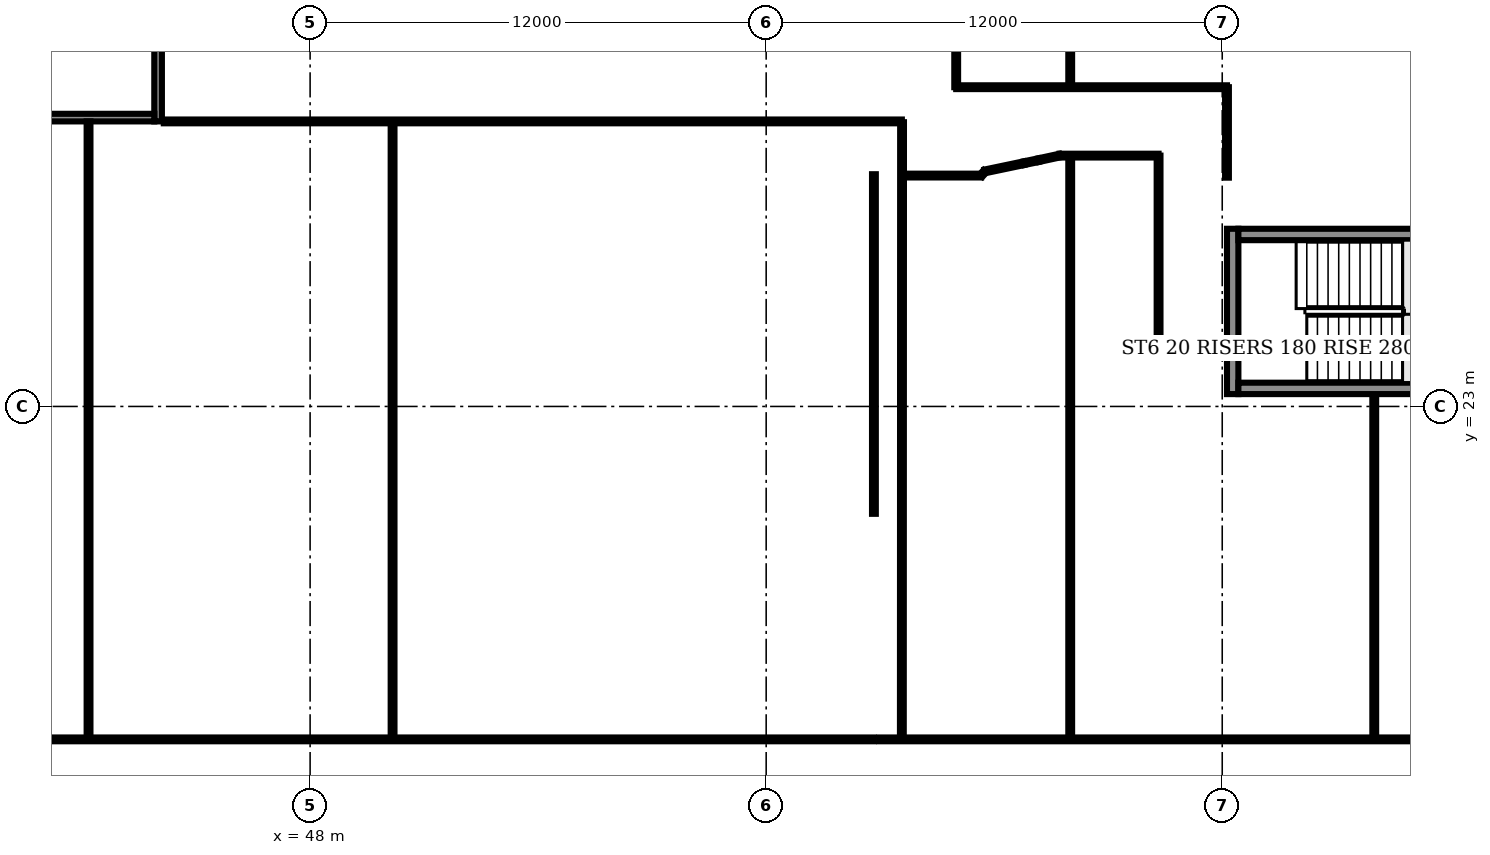
"""IFC4 building model, lengths in metres.
Left out: names, types, materials, properties, quantities, classifications, styles, units other than length and angle.
Written with IfcOpenShell. Run it as: python <this file> out.ifc"""

import sys

from ifc_helpers import new_model, si_unit, direction, frame, frame_2d, origin, origin_2d, place, context, subcontext, project, spatial, rectangle, i_section, extrude, element, fill, save


model = new_model("IFC4")
c1 = context("Model", 3, precision=1e-05, world=origin(), true_north=direction((0.0, 1.0)))
c2 = subcontext(c1, "Body", "Model", "MODEL_VIEW")
j1 = project(units=[si_unit("LENGTHUNIT", "METRE"), si_unit("PLANEANGLEUNIT", "RADIAN")], contexts=[c1])
p1 = place(None, origin())
s1 = spatial("IfcSite", under=j1, at=p1, CompositionType="ELEMENT")
p2 = place(p1, origin())
s2 = spatial("IfcBuilding", under=s1, at=p2, CompositionType="ELEMENT")
p3 = place(p2, frame((0.0, 0.0, 41.5)))
s3 = spatial("IfcBuildingStorey", under=s2, at=p3, CompositionType="ELEMENT", Elevation=41.5)
for number, where, z_axis, x_axis in (
    (1, (48.0, 23.0, 0.0), (0.0, 0.0, 1.0), (1.0, 0.0, 0.0)),
    (2, (60.0, 23.0, 0.0), (0.0, 0.0, 1.0), (1.0, 0.0, 0.0)),
):
    element("IfcColumn", number, at=place(p3, frame(where, z_axis=z_axis, x_axis=x_axis)), inside=s3, PredefinedType="COLUMN", context=c2, shape_type="SweptSolid", body=[
        extrude(i_section(OverallWidth=0.305, OverallDepth=0.62, WebThickness=0.021, FlangeThickness=0.04, FilletRadius=0.027, at=origin_2d()), origin(), (0.0, 0.0, 1.0), 3.6),
    ])
p4 = place(p3, frame((91.926, 0.211, 0.0), z_axis=(0.0, 0.0, 1.0), x_axis=(-0.351119, 0.93633, 0.0)))
e3 = element("IfcWall", 3, at=p4, inside=s3, PredefinedType="SOLIDWALL", context=c2, shape_type="SweptSolid", body=[
    extrude(rectangle(XDim=44.757, YDim=0.35, at=frame_2d((22.378, 0.0))), origin(), (0.0, 0.0, 1.0), 1.0),
])
p5 = place(p3, frame((44.0, 30.5, 0.0), z_axis=(0.0, 0.0, 1.0), x_axis=(0.0, 1.0, 0.0)))
e4 = element("IfcWall", 4, at=p5, inside=s3, PredefinedType="PARTITIONING", context=c2, shape_type="SweptSolid", body=[
    extrude(rectangle(XDim=3.5, YDim=0.2, at=frame_2d((1.75, 0.0))), origin(), (0.0, 0.0, 1.0), 3.2),
])
p6 = place(p5, frame((1.2, 0.0, 0.0)))
e5 = element("IfcOpeningElement", 5, at=p6, cuts=e4, PredefinedType="OPENING", context=c2, shape_type="SweptSolid", body=[
    extrude(rectangle(XDim=1.1, YDim=2.1, at=frame_2d((0.55, 1.05))), frame((0.0, 0.11, 0.0), z_axis=(0.0, -1.0, 0.0), x_axis=(1.0, 0.0, 0.0)), (0.0, 0.0, 1.0), 0.22),
])
p7 = place(p3, frame((41.1, 30.6, 0.0), z_axis=(0.0, 0.0, 1.0), x_axis=(1.0, 0.0, 0.0)))
e6 = element("IfcWall", 6, at=p7, inside=s3, PredefinedType="PARTITIONING", context=c2, shape_type="SweptSolid", body=[
    extrude(rectangle(XDim=2.8, YDim=0.2, at=frame_2d((1.4, 0.0))), origin(), (0.0, 0.0, 1.0), 3.2),
])
p8 = place(p3, frame((72.275, 23.325, 0.0), z_axis=(0.0, 0.0, 1.0), x_axis=(0.0, 1.0, 0.0)))
e7 = element("IfcWall", 7, at=p8, inside=s3, PredefinedType="SHEAR", context=c2, shape_type="SweptSolid", body=[
    extrude(rectangle(XDim=4.35, YDim=0.3, at=frame_2d((2.175, 0.0))), origin(), (0.0, 0.0, 1.0), 3.2),
])
p9 = place(p8, frame((1.575, 0.0, 0.0)))
e8 = element("IfcOpeningElement", 8, at=p9, cuts=e7, PredefinedType="OPENING", context=c2, shape_type="SweptSolid", body=[
    extrude(rectangle(XDim=1.2, YDim=2.1, at=frame_2d((0.6, 1.05))), frame((0.0, 0.16, 0.0), z_axis=(0.0, -1.0, 0.0), x_axis=(1.0, 0.0, 0.0)), (0.0, 0.0, 1.0), 0.32),
])
p10 = place(p3, frame((11.2, 14.24, 0.0), z_axis=(0.0, 0.0, 1.0), x_axis=(1.0, 0.0, 0.0)))
e9 = element("IfcWall", 9, at=p10, inside=s3, PredefinedType="PARTITIONING", context=c2, shape_type="SweptSolid", body=[
    extrude(rectangle(XDim=51.635, YDim=0.1, at=frame_2d((25.817, 0.0))), origin(), (0.0, 0.0, 1.0), 3.2),
])
p11 = place(p10, frame((0.115, 0.0, 0.0)))
e10 = element("IfcOpeningElement", 10, at=p11, cuts=e9, PredefinedType="OPENING", context=c2, shape_type="SweptSolid", body=[
    extrude(rectangle(XDim=1.0, YDim=2.1, at=frame_2d((0.5, 1.05))), frame((0.0, 0.06, 0.0), z_axis=(0.0, -1.0, 0.0), x_axis=(1.0, 0.0, 0.0)), (0.0, 0.0, 1.0), 0.12),
])
p12 = place(p10, frame((6.635, 0.0, 0.0)))
e11 = element("IfcOpeningElement", 11, at=p12, cuts=e9, PredefinedType="OPENING", context=c2, shape_type="SweptSolid", body=[
    extrude(rectangle(XDim=1.0, YDim=2.1, at=frame_2d((0.5, 1.05))), frame((0.0, 0.06, 0.0), z_axis=(0.0, -1.0, 0.0), x_axis=(1.0, 0.0, 0.0)), (0.0, 0.0, 1.0), 0.12),
])
p13 = place(p10, frame((22.7, 0.0, 0.0)))
e12 = element("IfcOpeningElement", 12, at=p13, cuts=e9, PredefinedType="OPENING", context=c2, shape_type="SweptSolid", body=[
    extrude(rectangle(XDim=1.0, YDim=2.1, at=frame_2d((0.5, 1.05))), frame((0.0, 0.06, 0.0), z_axis=(0.0, -1.0, 0.0), x_axis=(1.0, 0.0, 0.0)), (0.0, 0.0, 1.0), 0.12),
])
p14 = place(p10, frame((27.865, 0.0, 0.0)))
e13 = element("IfcOpeningElement", 13, at=p14, cuts=e9, PredefinedType="OPENING", context=c2, shape_type="SweptSolid", body=[
    extrude(rectangle(XDim=1.0, YDim=2.1, at=frame_2d((0.5, 1.05))), frame((0.0, 0.06, 0.0), z_axis=(0.0, -1.0, 0.0), x_axis=(1.0, 0.0, 0.0)), (0.0, 0.0, 1.0), 0.12),
])
p15 = place(p10, frame((34.065, 0.0, 0.0)))
e14 = element("IfcOpeningElement", 14, at=p15, cuts=e9, PredefinedType="OPENING", context=c2, shape_type="SweptSolid", body=[
    extrude(rectangle(XDim=1.8, YDim=2.1, at=frame_2d((0.9, 1.05))), frame((0.0, 0.06, 0.0), z_axis=(0.0, -1.0, 0.0), x_axis=(1.0, 0.0, 0.0)), (0.0, 0.0, 1.0), 0.12),
])
p16 = place(p10, frame((41.765, 0.0, 0.0)))
e15 = element("IfcOpeningElement", 15, at=p16, cuts=e9, PredefinedType="OPENING", context=c2, shape_type="SweptSolid", body=[
    extrude(rectangle(XDim=1.8, YDim=2.1, at=frame_2d((0.9, 1.05))), frame((0.0, 0.06, 0.0), z_axis=(0.0, -1.0, 0.0), x_axis=(1.0, 0.0, 0.0)), (0.0, 0.0, 1.0), 0.12),
])
for number, where, z_axis, x_axis in (
    (16, (42.17, 14.24, 0.0), (0.0, 0.0, 1.0), (0.0, 1.0, 0.0)),
    (17, (50.17, 14.24, 0.0), (0.0, 0.0, 1.0), (0.0, 1.0, 0.0)),
    (18, (57.67, 14.24, 0.0), (0.0, 0.0, 1.0), (0.0, 1.0, 0.0)),
):
    element("IfcWall", number, at=place(p3, frame(where, z_axis=z_axis, x_axis=x_axis)), inside=s3, PredefinedType="PARTITIONING", context=c2, shape_type="SweptSolid", body=[
        extrude(rectangle(XDim=16.26, YDim=0.1, at=frame_2d((8.13, 0.0))), origin(), (0.0, 0.0, 1.0), 3.2),
    ])
p17 = place(p3, frame((62.835, 20.175, 0.0), z_axis=(0.0, 0.0, 1.0), x_axis=(0.0, 1.0, 0.0)))
e19 = element("IfcWall", 19, at=p17, inside=s3, PredefinedType="PARTITIONING", context=c2, shape_type="SweptSolid", body=[
    extrude(rectangle(XDim=8.935, YDim=0.1, at=frame_2d((4.468, 0.0))), origin(), (0.0, 0.0, 1.0), 3.2),
])
p18 = place(p3, frame((62.98, 14.24, 0.0), z_axis=(0.0, 0.0, 1.0), x_axis=(1.0, 0.0, 0.0)))
e20 = element("IfcWall", 20, at=p18, inside=s3, PredefinedType="PARTITIONING", context=c2, shape_type="SweptSolid", body=[
    extrude(rectangle(XDim=23.01, YDim=0.1, at=frame_2d((11.505, 0.0))), origin(), (0.0, 0.0, 1.0), 3.2),
])
p19 = place(p18, frame((8.6, 0.0, 0.0)))
e21 = element("IfcOpeningElement", 21, at=p19, cuts=e20, PredefinedType="OPENING", context=c2, shape_type="SweptSolid", body=[
    extrude(rectangle(XDim=1.0, YDim=2.1, at=frame_2d((0.5, 1.05))), frame((0.0, 0.06, 0.0), z_axis=(0.0, -1.0, 0.0), x_axis=(1.0, 0.0, 0.0)), (0.0, 0.0, 1.0), 0.12),
])
p20 = place(p18, frame((17.595, 0.0, 0.0)))
e22 = element("IfcOpeningElement", 22, at=p20, cuts=e20, PredefinedType="OPENING", context=c2, shape_type="SweptSolid", body=[
    extrude(rectangle(XDim=1.0, YDim=2.1, at=frame_2d((0.5, 1.05))), frame((0.0, 0.06, 0.0), z_axis=(0.0, -1.0, 0.0), x_axis=(1.0, 0.0, 0.0)), (0.0, 0.0, 1.0), 0.12),
])
p21 = place(p3, frame((63.57, 14.245, 0.0), z_axis=(0.0, 0.0, 1.0), x_axis=(0.000331, 1.000002, 0.0)))
e23 = element("IfcWall", 23, at=p21, inside=s3, PredefinedType="PARTITIONING", context=c2, shape_type="SweptSolid", body=[
    extrude(rectangle(XDim=16.233, YDim=0.1, at=frame_2d((8.117, 0.0))), origin(), (0.0, 0.0, 1.0), 3.2),
])
p22 = place(p3, frame((63.575, 29.075, 0.0), z_axis=(0.0, 0.0, 1.0), x_axis=(1.0, 0.0, 0.0)))
e24 = element("IfcWall", 24, at=p22, inside=s3, PredefinedType="PARTITIONING", context=c2, shape_type="SweptSolid", body=[
    extrude(rectangle(XDim=2.08, YDim=0.1, at=frame_2d((1.04, 0.0))), origin(), (0.0, 0.0, 1.0), 3.2),
])
p23 = place(p22, frame((0.62, 0.0, 0.0)))
e25 = element("IfcOpeningElement", 25, at=p23, cuts=e24, PredefinedType="OPENING", context=c2, shape_type="SweptSolid", body=[
    extrude(rectangle(XDim=1.0, YDim=2.1, at=frame_2d((0.5, 1.05))), frame((0.0, 0.06, 0.0), z_axis=(0.0, -1.0, 0.0), x_axis=(1.0, 0.0, 0.0)), (0.0, 0.0, 1.0), 0.12),
])
p24 = place(p3, frame((65.0, 31.4, 0.0), z_axis=(0.0, 0.0, 1.0), x_axis=(0.0, 1.0, 0.0)))
e26 = element("IfcWall", 26, at=p24, inside=s3, PredefinedType="PARTITIONING", context=c2, shape_type="SweptSolid", body=[
    extrude(rectangle(XDim=2.58, YDim=0.1, at=frame_2d((1.29, 0.0))), origin(), (0.0, 0.0, 1.0), 3.2),
])
p25 = place(p3, frame((65.0, 31.4, 0.0), z_axis=(0.0, 0.0, 1.0), x_axis=(1.0, 0.0, 0.0)))
e27 = element("IfcWall", 27, at=p25, inside=s3, PredefinedType="PARTITIONING", context=c2, shape_type="SweptSolid", body=[
    extrude(rectangle(XDim=7.125, YDim=0.1, at=frame_2d((3.562, 0.0))), origin(), (0.0, 0.0, 1.0), 3.2),
])
p26 = place(p25, frame((0.1, 0.0, 0.0)))
e28 = element("IfcOpeningElement", 28, at=p26, cuts=e27, PredefinedType="OPENING", context=c2, shape_type="SweptSolid", body=[
    extrude(rectangle(XDim=1.0, YDim=2.1, at=frame_2d((0.5, 1.05))), frame((0.0, 0.06, 0.0), z_axis=(0.0, -1.0, 0.0), x_axis=(1.0, 0.0, 0.0)), (0.0, 0.0, 1.0), 0.12),
])
p27 = place(p25, frame((5.625, 0.0, 0.0)))
e29 = element("IfcOpeningElement", 29, at=p27, cuts=e27, PredefinedType="OPENING", context=c2, shape_type="SweptSolid", body=[
    extrude(rectangle(XDim=1.0, YDim=2.1, at=frame_2d((0.5, 1.05))), frame((0.0, 0.06, 0.0), z_axis=(0.0, -1.0, 0.0), x_axis=(1.0, 0.0, 0.0)), (0.0, 0.0, 1.0), 0.12),
])
p28 = place(p3, frame((65.655, 29.075, 0.0), z_axis=(0.0, 0.0, 1.0), x_axis=(0.671773, 0.740757, 0.0)))
e30 = element("IfcWall", 30, at=p28, inside=s3, PredefinedType="PARTITIONING", context=c2, shape_type="SweptSolid", body=[
    extrude(rectangle(XDim=0.149, YDim=0.1, at=frame_2d((0.074, 0.0))), origin(), (0.0, 0.0, 1.0), 3.2),
])
p29 = place(p3, frame((65.755, 29.185, 0.0), z_axis=(0.0, 0.0, 1.0), x_axis=(0.978739, 0.205118, 0.0)))
e31 = element("IfcWall", 31, at=p29, inside=s3, PredefinedType="PARTITIONING", context=c2, shape_type="SweptSolid", body=[
    extrude(rectangle(XDim=1.047, YDim=0.1, at=frame_2d((0.524, 0.0))), origin(), (0.0, 0.0, 1.0), 3.2),
])
p30 = place(p3, frame((66.78, 29.4, 0.0), z_axis=(0.0, 0.0, 1.0), x_axis=(0.979048, 0.203632, 0.0)))
e32 = element("IfcWall", 32, at=p30, inside=s3, PredefinedType="PARTITIONING", context=c2, shape_type="SweptSolid", body=[
    extrude(rectangle(XDim=0.393, YDim=0.1, at=frame_2d((0.197, 0.0))), origin(), (0.0, 0.0, 1.0), 3.2),
])
p31 = place(p3, frame((67.165, 29.48, 0.0), z_axis=(0.0, 0.0, 1.0), x_axis=(0.977367, 0.211555, 0.0)))
e33 = element("IfcWall", 33, at=p31, inside=s3, PredefinedType="PARTITIONING", context=c2, shape_type="SweptSolid", body=[
    extrude(rectangle(XDim=0.568, YDim=0.1, at=frame_2d((0.284, 0.0))), origin(), (0.0, 0.0, 1.0), 3.2),
])
p32 = place(p3, frame((67.72, 29.6, 0.0), z_axis=(0.0, 0.0, 1.0), x_axis=(1.0, 0.0, 0.0)))
e34 = element("IfcWall", 34, at=p32, inside=s3, PredefinedType="PARTITIONING", context=c2, shape_type="SweptSolid", body=[
    extrude(rectangle(XDim=2.605, YDim=0.1, at=frame_2d((1.302, 0.0))), origin(), (0.0, 0.0, 1.0), 3.2),
])
p33 = place(p3, frame((68.0, 14.24, 0.0), z_axis=(0.0, 0.0, 1.0), x_axis=(0.0, 1.0, 0.0)))
e35 = element("IfcWall", 35, at=p33, inside=s3, PredefinedType="PARTITIONING", context=c2, shape_type="SweptSolid", body=[
    extrude(rectangle(XDim=15.36, YDim=0.1, at=frame_2d((7.68, 0.0))), origin(), (0.0, 0.0, 1.0), 3.2),
])
p34 = place(p3, frame((68.0, 31.4, 0.0), z_axis=(0.0, 0.0, 1.0), x_axis=(0.0, 1.0, 0.0)))
e36 = element("IfcWall", 36, at=p34, inside=s3, PredefinedType="PARTITIONING", context=c2, shape_type="SweptSolid", body=[
    extrude(rectangle(XDim=8.39, YDim=0.1, at=frame_2d((4.195, 0.0))), origin(), (0.0, 0.0, 1.0), 3.2),
])
p35 = place(p3, frame((70.325, 24.6, 0.0), z_axis=(0.0, 0.0, 1.0), x_axis=(0.0, 1.0, 0.0)))
e37 = element("IfcWall", 37, at=p35, inside=s3, PredefinedType="PARTITIONING", context=c2, shape_type="SweptSolid", body=[
    extrude(rectangle(XDim=5.0, YDim=0.1, at=frame_2d((2.5, 0.0))), origin(), (0.0, 0.0, 1.0), 3.2),
])
p36 = place(p3, frame((70.325, 24.6, 0.0), z_axis=(0.0, 0.0, 1.0), x_axis=(1.0, 0.0, 0.0)))
e38 = element("IfcWall", 38, at=p36, inside=s3, PredefinedType="PARTITIONING", context=c2, shape_type="SweptSolid", body=[
    extrude(rectangle(XDim=0.38, YDim=0.1, at=frame_2d((0.19, 0.0))), origin(), (0.0, 0.0, 1.0), 3.2),
])
p37 = place(p3, frame((70.825, 24.35, 0.0), z_axis=(0.0, 0.0, 1.0), x_axis=(1.0, 0.0, 0.0)))
e39 = element("IfcWall", 39, at=p37, inside=s3, PredefinedType="PARTITIONING", context=c2, shape_type="SweptSolid", body=[
    extrude(rectangle(XDim=1.28, YDim=0.1, at=frame_2d((0.64, 0.0))), origin(), (0.0, 0.0, 1.0), 3.2),
])
p38 = place(p3, frame((72.125, 29.02, 0.0), z_axis=(0.0, 0.0, 1.0), x_axis=(0.0, 1.0, 0.0)))
e40 = element("IfcWall", 40, at=p38, inside=s3, PredefinedType="PARTITIONING", context=c2, shape_type="SweptSolid", body=[
    extrude(rectangle(XDim=2.38, YDim=0.1, at=frame_2d((1.19, 0.0))), origin(), (0.0, 0.0, 1.0), 3.2),
])
p39 = place(p3, frame((76.0, 14.24, 0.0), z_axis=(0.0, 0.0, 1.0), x_axis=(0.0, 1.0, 0.0)))
e41 = element("IfcWall", 41, at=p39, inside=s3, PredefinedType="PARTITIONING", context=c2, shape_type="SweptSolid", body=[
    extrude(rectangle(XDim=9.085, YDim=0.1, at=frame_2d((4.542, 0.0))), origin(), (0.0, 0.0, 1.0), 3.2),
])
p40 = place(p3, frame((44.15, 30.5, 0.0), z_axis=(0.0, 0.0, 1.0), x_axis=(1.0, 0.0, 0.0)))
e42 = element("IfcWall", 42, at=p40, inside=s3, PredefinedType="PARTITIONING", context=c2, shape_type="SweptSolid", body=[
    extrude(rectangle(XDim=19.42, YDim=0.1, at=frame_2d((9.71, 0.0))), origin(), (0.0, 0.0, 1.0), 3.2),
])
p41 = place(p40, frame((15.54, 0.0, 0.0)))
e43 = element("IfcOpeningElement", 43, at=p41, cuts=e42, PredefinedType="OPENING", context=c2, shape_type="SweptSolid", body=[
    extrude(rectangle(XDim=1.0, YDim=2.1, at=frame_2d((0.5, 1.05))), frame((0.0, 0.06, 0.0), z_axis=(0.0, -1.0, 0.0), x_axis=(1.0, 0.0, 0.0)), (0.0, 0.0, 1.0), 0.12),
])
for number, where, z_axis, x_axis in (
    (44, (72.425, 23.475, 0.0), (0.0, 0.0, 1.0), (1.0, 0.0, 0.0)),
    (45, (72.425, 27.525, 0.0), (0.0, 0.0, 1.0), (1.0, 0.0, 0.0)),
):
    element("IfcWall", number, at=place(p3, frame(where, z_axis=z_axis, x_axis=x_axis)), inside=s3, PredefinedType="SHEAR", context=c2, shape_type="SweptSolid", body=[
        extrude(rectangle(XDim=7.5, YDim=0.3, at=frame_2d((3.75, 0.0))), origin(), (0.0, 0.0, 1.0), 3.2),
    ])
p42 = place(p6, origin())
e46 = element("IfcDoor", 46, at=p42, inside=s3, OperationType="SINGLE_SWING_LEFT", PredefinedType="DOOR", context=c2, shape_type="SweptSolid", body=[
    extrude(rectangle(XDim=1.1, YDim=2.1, at=frame_2d((0.55, 1.05))), frame((0.0, 0.025, 0.0), z_axis=(0.0, -1.0, 0.0), x_axis=(1.0, 0.0, 0.0)), (0.0, 0.0, 1.0), 0.05),
])
fill(e5, e46)
p43 = place(p9, origin())
e47 = element("IfcDoor", 47, at=p43, inside=s3, OperationType="SINGLE_SWING_RIGHT", PredefinedType="DOOR", context=c2, shape_type="SweptSolid", body=[
    extrude(rectangle(XDim=1.2, YDim=2.1, at=frame_2d((0.6, 1.05))), frame((0.0, 0.025, 0.0), z_axis=(0.0, -1.0, 0.0), x_axis=(1.0, 0.0, 0.0)), (0.0, 0.0, 1.0), 0.05),
])
fill(e8, e47)
p44 = place(p15, origin())
e48 = element("IfcDoor", 48, at=p44, inside=s3, OperationType="DOUBLE_DOOR_SINGLE_SWING", PredefinedType="DOOR", context=c2, shape_type="SweptSolid", body=[
    extrude(rectangle(XDim=1.8, YDim=2.1, at=frame_2d((0.9, 1.05))), frame((0.0, 0.025, 0.0), z_axis=(0.0, -1.0, 0.0), x_axis=(1.0, 0.0, 0.0)), (0.0, 0.0, 1.0), 0.05),
])
fill(e14, e48)
p45 = place(p16, origin())
e49 = element("IfcDoor", 49, at=p45, inside=s3, OperationType="DOUBLE_DOOR_SINGLE_SWING", PredefinedType="DOOR", context=c2, shape_type="SweptSolid", body=[
    extrude(rectangle(XDim=1.8, YDim=2.1, at=frame_2d((0.9, 1.05))), frame((0.0, 0.025, 0.0), z_axis=(0.0, -1.0, 0.0), x_axis=(1.0, 0.0, 0.0)), (0.0, 0.0, 1.0), 0.05),
])
fill(e15, e49)
p46 = place(p19, origin())
e50 = element("IfcDoor", 50, at=p46, inside=s3, OperationType="SINGLE_SWING_LEFT", PredefinedType="DOOR", context=c2, shape_type="SweptSolid", body=[
    extrude(rectangle(XDim=1.0, YDim=2.1, at=frame_2d((0.5, 1.05))), frame((0.0, 0.025, 0.0), z_axis=(0.0, -1.0, 0.0), x_axis=(1.0, 0.0, 0.0)), (0.0, 0.0, 1.0), 0.05),
])
fill(e21, e50)
p47 = place(p23, origin())
e51 = element("IfcDoor", 51, at=p47, inside=s3, OperationType="SINGLE_SWING_RIGHT", PredefinedType="DOOR", context=c2, shape_type="SweptSolid", body=[
    extrude(rectangle(XDim=1.0, YDim=2.1, at=frame_2d((0.5, 1.05))), frame((0.0, 0.025, 0.0), z_axis=(0.0, -1.0, 0.0), x_axis=(1.0, 0.0, 0.0)), (0.0, 0.0, 1.0), 0.05),
])
fill(e25, e51)
p48 = place(p41, origin())
e52 = element("IfcDoor", 52, at=p48, inside=s3, OperationType="SINGLE_SWING_RIGHT", PredefinedType="DOOR", context=c2, shape_type="SweptSolid", body=[
    extrude(rectangle(XDim=1.0, YDim=2.1, at=frame_2d((0.5, 1.05))), frame((0.0, 0.025, 0.0), z_axis=(0.0, -1.0, 0.0), x_axis=(1.0, 0.0, 0.0)), (0.0, 0.0, 1.0), 0.05),
])
fill(e43, e52)
p49 = place(p26, origin())
e53 = element("IfcDoor", 53, at=p49, inside=s3, OperationType="SINGLE_SWING_LEFT", PredefinedType="DOOR", context=c2, shape_type="SweptSolid", body=[
    extrude(rectangle(XDim=1.0, YDim=2.1, at=frame_2d((0.5, 1.05))), frame((0.0, 0.025, 0.0), z_axis=(0.0, -1.0, 0.0), x_axis=(1.0, 0.0, 0.0)), (0.0, 0.0, 1.0), 0.05),
])
fill(e28, e53)
p50 = place(p27, origin())
e54 = element("IfcDoor", 54, at=p50, inside=s3, OperationType="SINGLE_SWING_RIGHT", PredefinedType="DOOR", context=c2, shape_type="SweptSolid", body=[
    extrude(rectangle(XDim=1.0, YDim=2.1, at=frame_2d((0.5, 1.05))), frame((0.0, 0.025, 0.0), z_axis=(0.0, -1.0, 0.0), x_axis=(1.0, 0.0, 0.0)), (0.0, 0.0, 1.0), 0.05),
])
fill(e29, e54)
save(model, sys.argv[1])
